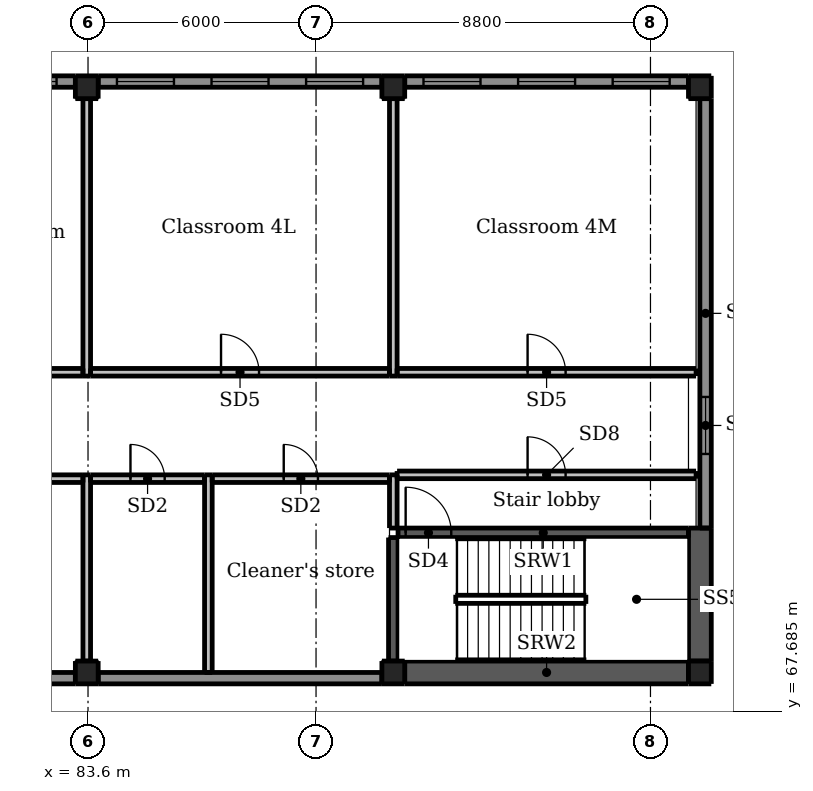
"""IFC4 building model, lengths in metres.
Left out: names, types, materials, properties, quantities, classifications, styles, units other than length and angle.
Written with IfcOpenShell. Run it as: python <this file> out.ifc"""

import sys

from ifc_helpers import new_model, si_unit, direction, frame, frame_2d, origin, origin_2d, place, context, subcontext, project, spatial, rectangle, extrude, element, fill, save


model = new_model("IFC4")
c1 = context("Model", 3, precision=1e-05, world=origin(), true_north=direction((0.0, 1.0)))
c2 = subcontext(c1, "Body", "Model", "MODEL_VIEW")
j1 = project(units=[si_unit("LENGTHUNIT", "METRE"), si_unit("PLANEANGLEUNIT", "RADIAN")], contexts=[c1])
p1 = place(None, origin())
s1 = spatial("IfcSite", under=j1, at=p1, CompositionType="ELEMENT")
p2 = place(p1, origin())
s2 = spatial("IfcBuilding", under=s1, at=p2, CompositionType="ELEMENT")
p3 = place(p2, frame((0.0, 0.0, 19.0)))
s3 = spatial("IfcBuildingStorey", under=s2, at=p3, CompositionType="ELEMENT", Elevation=19.0)
for number, where, z_axis, x_axis in (
    (1, (83.6, 67.4, 0.0), (0.0, 0.0, 1.0), (1.0, 0.0, 0.0)),
    (2, (89.6, 67.4, 0.0), (0.0, 0.0, 1.0), (1.0, 0.0, 0.0)),
):
    element("IfcColumn", number, at=place(p3, frame(where, z_axis=z_axis, x_axis=x_axis)), inside=s3, PredefinedType="COLUMN", context=c2, shape_type="SweptSolid", body=[
        extrude(rectangle(XDim=1.2, YDim=1.2, at=origin_2d()), origin(), (0.0, 0.0, 1.0), 4.25),
    ])
for number, where, z_axis, x_axis in (
    (3, (83.567, 84.1, -0.3), (0.0, 0.0, 1.0), (1.0, 0.0, 0.0)),
    (4, (83.567, 68.7, -0.3), (0.0, 0.0, 1.0), (1.0, 0.0, 0.0)),
    (5, (91.633, 84.1, -0.3), (0.0, 0.0, 1.0), (1.0, 0.0, 0.0)),
    (6, (91.633, 68.7, -0.3), (0.0, 0.0, 1.0), (1.0, 0.0, 0.0)),
    (7, (99.7, 84.1, -0.3), (0.0, 0.0, 1.0), (1.0, 0.0, 0.0)),
):
    element("IfcColumn", number, at=place(p3, frame(where, z_axis=z_axis, x_axis=x_axis)), inside=s3, PredefinedType="COLUMN", context=c2, shape_type="SweptSolid", body=[
        extrude(rectangle(XDim=0.6, YDim=0.6, at=origin_2d()), origin(), (0.0, 0.0, 1.0), 4.35),
    ])
p4 = place(p3, frame((99.7, 68.7, -0.3), z_axis=(0.0, 0.0, 1.0), x_axis=(1.0, 0.0, 0.0)))
e8 = element("IfcColumn", 8, at=p4, inside=s3, PredefinedType="COLUMN", context=c2, shape_type="SweptSolid", body=[
    extrude(rectangle(XDim=0.6, YDim=0.6, at=origin_2d()), origin(), (0.0, 0.0, 1.0), 4.8),
])
p5 = place(p3, frame((91.758, 72.375, -0.3), z_axis=(0.0, 0.0, 1.0), x_axis=(1.0, 0.0, 0.0)))
e9 = element("IfcWall", 9, at=p5, inside=s3, PredefinedType="SHEAR", context=c2, shape_type="SweptSolid", body=[
    extrude(rectangle(XDim=7.642, YDim=0.25, at=frame_2d((3.821, 0.0))), origin(), (0.0, 0.0, 1.0), 4.8),
])
p6 = place(p5, frame((0.2, 0.0, 0.3)))
e10 = element("IfcOpeningElement", 10, at=p6, cuts=e9, PredefinedType="OPENING", context=c2, shape_type="SweptSolid", body=[
    extrude(rectangle(XDim=1.2, YDim=2.1, at=frame_2d((0.6, 1.05))), frame((0.0, 0.135, 0.0), z_axis=(0.0, -1.0, 0.0), x_axis=(1.0, 0.0, 0.0)), (0.0, 0.0, 1.0), 0.27),
])
p7 = place(p3, frame((91.633, 69.0, -0.3), z_axis=(0.0, 0.0, 1.0), x_axis=(0.0, 1.0, 0.0)))
e11 = element("IfcWall", 11, at=p7, inside=s3, PredefinedType="SHEAR", context=c2, shape_type="SweptSolid", body=[
    extrude(rectangle(XDim=3.25, YDim=0.25, at=frame_2d((1.625, 0.0))), origin(), (0.0, 0.0, 1.0), 4.8),
])
p8 = place(p3, frame((99.7, 69.0, -0.3), z_axis=(0.0, 0.0, 1.0), x_axis=(0.0, 1.0, 0.0)))
e12 = element("IfcWall", 12, at=p8, inside=s3, PredefinedType="SHEAR", context=c2, shape_type="SweptSolid", body=[
    extrude(rectangle(XDim=3.5, YDim=0.6, at=frame_2d((1.75, 0.0))), origin(), (0.0, 0.0, 1.0), 4.8),
])
p9 = place(p3, frame((91.933, 68.7, -0.3), z_axis=(0.0, 0.0, 1.0), x_axis=(1.0, 0.0, 0.0)))
e13 = element("IfcWall", 13, at=p9, inside=s3, PredefinedType="SHEAR", context=c2, shape_type="SweptSolid", body=[
    extrude(rectangle(XDim=7.467, YDim=0.6, at=frame_2d((3.733, 0.0))), origin(), (0.0, 0.0, 1.0), 4.8),
])
for number, where, z_axis, x_axis in (
    (14, (78.2, 67.875, 0.0), (0.0, 0.0, 1.0), (1.0, 0.0, 0.0)),
    (15, (84.2, 67.875, 0.0), (0.0, 0.0, 1.0), (1.0, 0.0, 0.0)),
):
    element("IfcWall", number, at=place(p3, frame(where, z_axis=z_axis, x_axis=x_axis)), inside=s3, PredefinedType="SOLIDWALL", context=c2, shape_type="SweptSolid", body=[
        extrude(rectangle(XDim=4.8, YDim=0.25, at=frame_2d((2.4, 0.0))), origin(), (0.0, 0.0, 1.0), 4.25),
    ])
p10 = place(p3, frame((90.2, 67.875, 0.0), z_axis=(0.0, 0.0, 1.0), x_axis=(1.0, 0.0, 0.0)))
e16 = element("IfcWall", 16, at=p10, inside=s3, PredefinedType="SOLIDWALL", context=c2, shape_type="SweptSolid", body=[
    extrude(rectangle(XDim=9.8, YDim=0.25, at=frame_2d((4.9, 0.0))), origin(), (0.0, 0.0, 1.0), 4.25),
])
p11 = place(p3, frame((75.8, 84.25, 0.0), z_axis=(0.0, 0.0, 1.0), x_axis=(1.0, 0.0, 0.0)))
e17 = element("IfcWall", 17, at=p11, inside=s3, PredefinedType="SOLIDWALL", context=c2, shape_type="SweptSolid", body=[
    extrude(rectangle(XDim=7.467, YDim=0.3, at=frame_2d((3.733, 0.0))), origin(), (0.0, 0.0, 1.0), 3.15),
])
p12 = place(p11, frame((0.494, 0.0, 0.9)))
e18 = element("IfcOpeningElement", 18, at=p12, cuts=e17, PredefinedType="OPENING", context=c2, shape_type="SweptSolid", body=[
    extrude(rectangle(XDim=1.5, YDim=1.5, at=frame_2d((0.75, 0.75))), frame((0.0, 0.16, 0.0), z_axis=(0.0, -1.0, 0.0), x_axis=(1.0, 0.0, 0.0)), (0.0, 0.0, 1.0), 0.32),
])
p13 = place(p11, frame((2.983, 0.0, 0.9)))
e19 = element("IfcOpeningElement", 19, at=p13, cuts=e17, PredefinedType="OPENING", context=c2, shape_type="SweptSolid", body=[
    extrude(rectangle(XDim=1.5, YDim=1.5, at=frame_2d((0.75, 0.75))), frame((0.0, 0.16, 0.0), z_axis=(0.0, -1.0, 0.0), x_axis=(1.0, 0.0, 0.0)), (0.0, 0.0, 1.0), 0.32),
])
p14 = place(p11, frame((5.472, 0.0, 0.9)))
e20 = element("IfcOpeningElement", 20, at=p14, cuts=e17, PredefinedType="OPENING", context=c2, shape_type="SweptSolid", body=[
    extrude(rectangle(XDim=1.5, YDim=1.5, at=frame_2d((0.75, 0.75))), frame((0.0, 0.16, 0.0), z_axis=(0.0, -1.0, 0.0), x_axis=(1.0, 0.0, 0.0)), (0.0, 0.0, 1.0), 0.32),
])
p15 = place(p3, frame((83.867, 84.25, 0.0), z_axis=(0.0, 0.0, 1.0), x_axis=(1.0, 0.0, 0.0)))
e21 = element("IfcWall", 21, at=p15, inside=s3, PredefinedType="SOLIDWALL", context=c2, shape_type="SweptSolid", body=[
    extrude(rectangle(XDim=7.466, YDim=0.3, at=frame_2d((3.733, 0.0))), origin(), (0.0, 0.0, 1.0), 3.15),
])
p16 = place(p15, frame((0.494, 0.0, 0.9)))
e22 = element("IfcOpeningElement", 22, at=p16, cuts=e21, PredefinedType="OPENING", context=c2, shape_type="SweptSolid", body=[
    extrude(rectangle(XDim=1.5, YDim=1.5, at=frame_2d((0.75, 0.75))), frame((0.0, 0.16, 0.0), z_axis=(0.0, -1.0, 0.0), x_axis=(1.0, 0.0, 0.0)), (0.0, 0.0, 1.0), 0.32),
])
p17 = place(p15, frame((2.983, 0.0, 0.9)))
e23 = element("IfcOpeningElement", 23, at=p17, cuts=e21, PredefinedType="OPENING", context=c2, shape_type="SweptSolid", body=[
    extrude(rectangle(XDim=1.5, YDim=1.5, at=frame_2d((0.75, 0.75))), frame((0.0, 0.16, 0.0), z_axis=(0.0, -1.0, 0.0), x_axis=(1.0, 0.0, 0.0)), (0.0, 0.0, 1.0), 0.32),
])
p18 = place(p15, frame((5.472, 0.0, 0.9)))
e24 = element("IfcOpeningElement", 24, at=p18, cuts=e21, PredefinedType="OPENING", context=c2, shape_type="SweptSolid", body=[
    extrude(rectangle(XDim=1.5, YDim=1.5, at=frame_2d((0.75, 0.75))), frame((0.0, 0.16, 0.0), z_axis=(0.0, -1.0, 0.0), x_axis=(1.0, 0.0, 0.0)), (0.0, 0.0, 1.0), 0.32),
])
p19 = place(p3, frame((91.933, 84.25, 0.0), z_axis=(0.0, 0.0, 1.0), x_axis=(1.0, 0.0, 0.0)))
e25 = element("IfcWall", 25, at=p19, inside=s3, PredefinedType="SOLIDWALL", context=c2, shape_type="SweptSolid", body=[
    extrude(rectangle(XDim=7.467, YDim=0.3, at=frame_2d((3.733, 0.0))), origin(), (0.0, 0.0, 1.0), 3.15),
])
p20 = place(p19, frame((0.494, 0.0, 0.9)))
e26 = element("IfcOpeningElement", 26, at=p20, cuts=e25, PredefinedType="OPENING", context=c2, shape_type="SweptSolid", body=[
    extrude(rectangle(XDim=1.5, YDim=1.5, at=frame_2d((0.75, 0.75))), frame((0.0, 0.16, 0.0), z_axis=(0.0, -1.0, 0.0), x_axis=(1.0, 0.0, 0.0)), (0.0, 0.0, 1.0), 0.32),
])
p21 = place(p19, frame((2.983, 0.0, 0.9)))
e27 = element("IfcOpeningElement", 27, at=p21, cuts=e25, PredefinedType="OPENING", context=c2, shape_type="SweptSolid", body=[
    extrude(rectangle(XDim=1.5, YDim=1.5, at=frame_2d((0.75, 0.75))), frame((0.0, 0.16, 0.0), z_axis=(0.0, -1.0, 0.0), x_axis=(1.0, 0.0, 0.0)), (0.0, 0.0, 1.0), 0.32),
])
p22 = place(p19, frame((5.472, 0.0, 0.9)))
e28 = element("IfcOpeningElement", 28, at=p22, cuts=e25, PredefinedType="OPENING", context=c2, shape_type="SweptSolid", body=[
    extrude(rectangle(XDim=1.5, YDim=1.5, at=frame_2d((0.75, 0.75))), frame((0.0, 0.16, 0.0), z_axis=(0.0, -1.0, 0.0), x_axis=(1.0, 0.0, 0.0)), (0.0, 0.0, 1.0), 0.32),
])
p23 = place(p3, frame((99.85, 72.5, 0.0), z_axis=(0.0, 0.0, 1.0), x_axis=(0.0, 1.0, 0.0)))
e29 = element("IfcWall", 29, at=p23, inside=s3, PredefinedType="SOLIDWALL", context=c2, shape_type="SweptSolid", body=[
    extrude(rectangle(XDim=11.3, YDim=0.3, at=frame_2d((5.65, 0.0))), origin(), (0.0, 0.0, 1.0), 2.85),
])
p24 = place(p23, frame((1.95, 0.0, 0.9)))
e30 = element("IfcOpeningElement", 30, at=p24, cuts=e29, PredefinedType="OPENING", context=c2, shape_type="SweptSolid", body=[
    extrude(rectangle(XDim=1.5, YDim=1.5, at=frame_2d((0.75, 0.75))), frame((0.0, 0.16, 0.0), z_axis=(0.0, -1.0, 0.0), x_axis=(1.0, 0.0, 0.0)), (0.0, 0.0, 1.0), 0.32),
])
p25 = place(p3, frame((75.8, 68.55, 0.0), z_axis=(0.0, 0.0, 1.0), x_axis=(1.0, 0.0, 0.0)))
e31 = element("IfcWall", 31, at=p25, inside=s3, PredefinedType="SOLIDWALL", context=c2, shape_type="SweptSolid", body=[
    extrude(rectangle(XDim=7.467, YDim=0.3, at=frame_2d((3.733, 0.0))), origin(), (0.0, 0.0, 1.0), 3.15),
])
p26 = place(p3, frame((83.867, 68.55, 0.0), z_axis=(0.0, 0.0, 1.0), x_axis=(1.0, 0.0, 0.0)))
e32 = element("IfcWall", 32, at=p26, inside=s3, PredefinedType="SOLIDWALL", context=c2, shape_type="SweptSolid", body=[
    extrude(rectangle(XDim=7.466, YDim=0.3, at=frame_2d((3.733, 0.0))), origin(), (0.0, 0.0, 1.0), 3.15),
])
p27 = place(p3, frame((67.533, 76.6, 0.0), z_axis=(0.0, 0.0, 1.0), x_axis=(1.0, 0.0, 0.0)))
e33 = element("IfcWall", 33, at=p27, inside=s3, PredefinedType="PARTITIONING", context=c2, shape_type="SweptSolid", body=[
    extrude(rectangle(XDim=15.934, YDim=0.2, at=frame_2d((7.967, 0.0))), origin(), (0.0, 0.0, 1.0), 2.85),
])
p28 = place(p27, frame((7.467, 0.0, 0.0)))
e34 = element("IfcOpeningElement", 34, at=p28, cuts=e33, PredefinedType="OPENING", context=c2, shape_type="SweptSolid", body=[
    extrude(rectangle(XDim=1.0, YDim=2.1, at=frame_2d((0.5, 1.05))), frame((0.0, 0.11, 0.0), z_axis=(0.0, -1.0, 0.0), x_axis=(1.0, 0.0, 0.0)), (0.0, 0.0, 1.0), 0.22),
])
p29 = place(p3, frame((83.667, 76.6, 0.0), z_axis=(0.0, 0.0, 1.0), x_axis=(1.0, 0.0, 0.0)))
e35 = element("IfcWall", 35, at=p29, inside=s3, PredefinedType="PARTITIONING", context=c2, shape_type="SweptSolid", body=[
    extrude(rectangle(XDim=7.866, YDim=0.2, at=frame_2d((3.933, 0.0))), origin(), (0.0, 0.0, 1.0), 2.85),
])
p30 = place(p29, frame((3.433, 0.0, 0.0)))
e36 = element("IfcOpeningElement", 36, at=p30, cuts=e35, PredefinedType="OPENING", context=c2, shape_type="SweptSolid", body=[
    extrude(rectangle(XDim=1.0, YDim=2.1, at=frame_2d((0.5, 1.05))), frame((0.0, 0.11, 0.0), z_axis=(0.0, -1.0, 0.0), x_axis=(1.0, 0.0, 0.0)), (0.0, 0.0, 1.0), 0.22),
])
p31 = place(p3, frame((91.733, 76.6, 0.0), z_axis=(0.0, 0.0, 1.0), x_axis=(1.0, 0.0, 0.0)))
e37 = element("IfcWall", 37, at=p31, inside=s3, PredefinedType="PARTITIONING", context=c2, shape_type="SweptSolid", body=[
    extrude(rectangle(XDim=7.867, YDim=0.2, at=frame_2d((3.934, 0.0))), origin(), (0.0, 0.0, 1.0), 2.85),
])
p32 = place(p31, frame((3.434, 0.0, 0.0)))
e38 = element("IfcOpeningElement", 38, at=p32, cuts=e37, PredefinedType="OPENING", context=c2, shape_type="SweptSolid", body=[
    extrude(rectangle(XDim=1.0, YDim=2.1, at=frame_2d((0.5, 1.05))), frame((0.0, 0.11, 0.0), z_axis=(0.0, -1.0, 0.0), x_axis=(1.0, 0.0, 0.0)), (0.0, 0.0, 1.0), 0.22),
])
for number, where, z_axis, x_axis in (
    (39, (83.567, 76.5, 0.0), (0.0, 0.0, 1.0), (0.0, 1.0, 0.0)),
    (40, (91.633, 76.5, 0.0), (0.0, 0.0, 1.0), (0.0, 1.0, 0.0)),
):
    element("IfcWall", number, at=place(p3, frame(where, z_axis=z_axis, x_axis=x_axis)), inside=s3, PredefinedType="PARTITIONING", context=c2, shape_type="SweptSolid", body=[
        extrude(rectangle(XDim=7.3, YDim=0.2, at=frame_2d((3.65, 0.0))), origin(), (0.0, 0.0, 1.0), 2.85),
    ])
p33 = place(p3, frame((75.6, 73.8, 0.0), z_axis=(0.0, 0.0, 1.0), x_axis=(1.0, 0.0, 0.0)))
e41 = element("IfcWall", 41, at=p33, inside=s3, PredefinedType="PARTITIONING", context=c2, shape_type="SweptSolid", body=[
    extrude(rectangle(XDim=7.867, YDim=0.2, at=frame_2d((3.934, 0.0))), origin(), (0.0, 0.0, 1.0), 2.85),
])
p34 = place(p33, frame((3.483, 0.0, 0.0)))
e42 = element("IfcOpeningElement", 42, at=p34, cuts=e41, PredefinedType="OPENING", context=c2, shape_type="SweptSolid", body=[
    extrude(rectangle(XDim=0.9, YDim=2.1, at=frame_2d((0.45, 1.05))), frame((0.0, 0.11, 0.0), z_axis=(0.0, -1.0, 0.0), x_axis=(1.0, 0.0, 0.0)), (0.0, 0.0, 1.0), 0.22),
])
p35 = place(p3, frame((83.667, 73.8, 0.0), z_axis=(0.0, 0.0, 1.0), x_axis=(1.0, 0.0, 0.0)))
e43 = element("IfcWall", 43, at=p35, inside=s3, PredefinedType="PARTITIONING", context=c2, shape_type="SweptSolid", body=[
    extrude(rectangle(XDim=3.0, YDim=0.2, at=frame_2d((1.5, 0.0))), origin(), (0.0, 0.0, 1.0), 2.85),
])
p36 = place(p35, frame((1.05, 0.0, 0.0)))
e44 = element("IfcOpeningElement", 44, at=p36, cuts=e43, PredefinedType="OPENING", context=c2, shape_type="SweptSolid", body=[
    extrude(rectangle(XDim=0.9, YDim=2.1, at=frame_2d((0.45, 1.05))), frame((0.0, 0.11, 0.0), z_axis=(0.0, -1.0, 0.0), x_axis=(1.0, 0.0, 0.0)), (0.0, 0.0, 1.0), 0.22),
])
p37 = place(p3, frame((86.867, 73.8, 0.0), z_axis=(0.0, 0.0, 1.0), x_axis=(1.0, 0.0, 0.0)))
e45 = element("IfcWall", 45, at=p37, inside=s3, PredefinedType="PARTITIONING", context=c2, shape_type="SweptSolid", body=[
    extrude(rectangle(XDim=4.666, YDim=0.2, at=frame_2d((2.333, 0.0))), origin(), (0.0, 0.0, 1.0), 2.85),
])
p38 = place(p37, frame((1.883, 0.0, 0.0)))
e46 = element("IfcOpeningElement", 46, at=p38, cuts=e45, PredefinedType="OPENING", context=c2, shape_type="SweptSolid", body=[
    extrude(rectangle(XDim=0.9, YDim=2.1, at=frame_2d((0.45, 1.05))), frame((0.0, 0.11, 0.0), z_axis=(0.0, -1.0, 0.0), x_axis=(1.0, 0.0, 0.0)), (0.0, 0.0, 1.0), 0.22),
])
p39 = place(p3, frame((83.567, 69.0, 0.0), z_axis=(0.0, 0.0, 1.0), x_axis=(0.0, 1.0, 0.0)))
e47 = element("IfcWall", 47, at=p39, inside=s3, PredefinedType="PARTITIONING", context=c2, shape_type="SweptSolid", body=[
    extrude(rectangle(XDim=4.9, YDim=0.2, at=frame_2d((2.45, 0.0))), origin(), (0.0, 0.0, 1.0), 2.85),
])
p40 = place(p3, frame((91.633, 72.5, 0.0), z_axis=(0.0, 0.0, 1.0), x_axis=(0.0, 1.0, 0.0)))
e48 = element("IfcWall", 48, at=p40, inside=s3, PredefinedType="PARTITIONING", context=c2, shape_type="SweptSolid", body=[
    extrude(rectangle(XDim=1.4, YDim=0.2, at=frame_2d((0.7, 0.0))), origin(), (0.0, 0.0, 1.0), 2.85),
])
p41 = place(p3, frame((86.767, 68.7, 0.0), z_axis=(0.0, 0.0, 1.0), x_axis=(0.0, 1.0, 0.0)))
e49 = element("IfcWall", 49, at=p41, inside=s3, PredefinedType="PARTITIONING", context=c2, shape_type="SweptSolid", body=[
    extrude(rectangle(XDim=5.2, YDim=0.2, at=frame_2d((2.6, 0.0))), origin(), (0.0, 0.0, 1.0), 2.85),
])
p42 = place(p3, frame((91.733, 73.9, 0.0), z_axis=(0.0, 0.0, 1.0), x_axis=(1.0, 0.0, 0.0)))
e50 = element("IfcWall", 50, at=p42, inside=s3, PredefinedType="PARTITIONING", context=c2, shape_type="SweptSolid", body=[
    extrude(rectangle(XDim=7.867, YDim=0.2, at=frame_2d((3.934, 0.0))), origin(), (0.0, 0.0, 1.0), 2.85),
])
p43 = place(p42, frame((3.434, 0.0, 0.0)))
e51 = element("IfcOpeningElement", 51, at=p43, cuts=e50, PredefinedType="OPENING", context=c2, shape_type="SweptSolid", body=[
    extrude(rectangle(XDim=1.0, YDim=2.1, at=frame_2d((0.5, 1.05))), frame((0.0, 0.11, 0.0), z_axis=(0.0, -1.0, 0.0), x_axis=(1.0, 0.0, 0.0)), (0.0, 0.0, 1.0), 0.22),
])
p44 = place(p14, origin())
e52 = element("IfcWindow", 52, at=p44, inside=s3, PartitioningType="DOUBLE_PANEL_HORIZONTAL", PredefinedType="WINDOW", context=c2, shape_type="SweptSolid", body=[
    extrude(rectangle(XDim=1.5, YDim=1.5, at=frame_2d((0.75, 0.75))), frame((0.0, 0.03, 0.0), z_axis=(0.0, -1.0, 0.0), x_axis=(1.0, 0.0, 0.0)), (0.0, 0.0, 1.0), 0.06),
])
fill(e20, e52)
p45 = place(p16, origin())
e53 = element("IfcWindow", 53, at=p45, inside=s3, PartitioningType="DOUBLE_PANEL_HORIZONTAL", PredefinedType="WINDOW", context=c2, shape_type="SweptSolid", body=[
    extrude(rectangle(XDim=1.5, YDim=1.5, at=frame_2d((0.75, 0.75))), frame((0.0, 0.03, 0.0), z_axis=(0.0, -1.0, 0.0), x_axis=(1.0, 0.0, 0.0)), (0.0, 0.0, 1.0), 0.06),
])
fill(e22, e53)
p46 = place(p17, origin())
e54 = element("IfcWindow", 54, at=p46, inside=s3, PartitioningType="DOUBLE_PANEL_HORIZONTAL", PredefinedType="WINDOW", context=c2, shape_type="SweptSolid", body=[
    extrude(rectangle(XDim=1.5, YDim=1.5, at=frame_2d((0.75, 0.75))), frame((0.0, 0.03, 0.0), z_axis=(0.0, -1.0, 0.0), x_axis=(1.0, 0.0, 0.0)), (0.0, 0.0, 1.0), 0.06),
])
fill(e23, e54)
p47 = place(p18, origin())
e55 = element("IfcWindow", 55, at=p47, inside=s3, PartitioningType="DOUBLE_PANEL_HORIZONTAL", PredefinedType="WINDOW", context=c2, shape_type="SweptSolid", body=[
    extrude(rectangle(XDim=1.5, YDim=1.5, at=frame_2d((0.75, 0.75))), frame((0.0, 0.03, 0.0), z_axis=(0.0, -1.0, 0.0), x_axis=(1.0, 0.0, 0.0)), (0.0, 0.0, 1.0), 0.06),
])
fill(e24, e55)
p48 = place(p20, origin())
e56 = element("IfcWindow", 56, at=p48, inside=s3, PartitioningType="DOUBLE_PANEL_HORIZONTAL", PredefinedType="WINDOW", context=c2, shape_type="SweptSolid", body=[
    extrude(rectangle(XDim=1.5, YDim=1.5, at=frame_2d((0.75, 0.75))), frame((0.0, 0.03, 0.0), z_axis=(0.0, -1.0, 0.0), x_axis=(1.0, 0.0, 0.0)), (0.0, 0.0, 1.0), 0.06),
])
fill(e26, e56)
p49 = place(p21, origin())
e57 = element("IfcWindow", 57, at=p49, inside=s3, PartitioningType="DOUBLE_PANEL_HORIZONTAL", PredefinedType="WINDOW", context=c2, shape_type="SweptSolid", body=[
    extrude(rectangle(XDim=1.5, YDim=1.5, at=frame_2d((0.75, 0.75))), frame((0.0, 0.03, 0.0), z_axis=(0.0, -1.0, 0.0), x_axis=(1.0, 0.0, 0.0)), (0.0, 0.0, 1.0), 0.06),
])
fill(e27, e57)
p50 = place(p22, origin())
e58 = element("IfcWindow", 58, at=p50, inside=s3, PartitioningType="DOUBLE_PANEL_HORIZONTAL", PredefinedType="WINDOW", context=c2, shape_type="SweptSolid", body=[
    extrude(rectangle(XDim=1.5, YDim=1.5, at=frame_2d((0.75, 0.75))), frame((0.0, 0.03, 0.0), z_axis=(0.0, -1.0, 0.0), x_axis=(1.0, 0.0, 0.0)), (0.0, 0.0, 1.0), 0.06),
])
fill(e28, e58)
p51 = place(p24, origin())
e59 = element("IfcWindow", 59, at=p51, inside=s3, PartitioningType="DOUBLE_PANEL_HORIZONTAL", PredefinedType="WINDOW", context=c2, shape_type="SweptSolid", body=[
    extrude(rectangle(XDim=1.5, YDim=1.5, at=frame_2d((0.75, 0.75))), frame((0.0, 0.03, 0.0), z_axis=(0.0, -1.0, 0.0), x_axis=(1.0, 0.0, 0.0)), (0.0, 0.0, 1.0), 0.06),
])
fill(e30, e59)
p52 = place(p30, origin())
e60 = element("IfcDoor", 60, at=p52, inside=s3, OperationType="SINGLE_SWING_LEFT", PredefinedType="DOOR", context=c2, shape_type="SweptSolid", body=[
    extrude(rectangle(XDim=1.0, YDim=2.1, at=frame_2d((0.5, 1.05))), frame((0.0, 0.025, 0.0), z_axis=(0.0, -1.0, 0.0), x_axis=(1.0, 0.0, 0.0)), (0.0, 0.0, 1.0), 0.05),
])
fill(e36, e60)
p53 = place(p32, origin())
e61 = element("IfcDoor", 61, at=p53, inside=s3, OperationType="SINGLE_SWING_LEFT", PredefinedType="DOOR", context=c2, shape_type="SweptSolid", body=[
    extrude(rectangle(XDim=1.0, YDim=2.1, at=frame_2d((0.5, 1.05))), frame((0.0, 0.025, 0.0), z_axis=(0.0, -1.0, 0.0), x_axis=(1.0, 0.0, 0.0)), (0.0, 0.0, 1.0), 0.05),
])
fill(e38, e61)
p54 = place(p36, origin())
e62 = element("IfcDoor", 62, at=p54, inside=s3, OperationType="SINGLE_SWING_LEFT", PredefinedType="DOOR", context=c2, shape_type="SweptSolid", body=[
    extrude(rectangle(XDim=0.9, YDim=2.1, at=frame_2d((0.45, 1.05))), frame((0.0, 0.025, 0.0), z_axis=(0.0, -1.0, 0.0), x_axis=(1.0, 0.0, 0.0)), (0.0, 0.0, 1.0), 0.05),
])
fill(e44, e62)
p55 = place(p38, origin())
e63 = element("IfcDoor", 63, at=p55, inside=s3, OperationType="SINGLE_SWING_LEFT", PredefinedType="DOOR", context=c2, shape_type="SweptSolid", body=[
    extrude(rectangle(XDim=0.9, YDim=2.1, at=frame_2d((0.45, 1.05))), frame((0.0, 0.025, 0.0), z_axis=(0.0, -1.0, 0.0), x_axis=(1.0, 0.0, 0.0)), (0.0, 0.0, 1.0), 0.05),
])
fill(e46, e63)
p56 = place(p43, origin())
e64 = element("IfcDoor", 64, at=p56, inside=s3, OperationType="SINGLE_SWING_LEFT", PredefinedType="DOOR", context=c2, shape_type="SweptSolid", body=[
    extrude(rectangle(XDim=1.0, YDim=2.1, at=frame_2d((0.5, 1.05))), frame((0.0, 0.025, 0.0), z_axis=(0.0, -1.0, 0.0), x_axis=(1.0, 0.0, 0.0)), (0.0, 0.0, 1.0), 0.05),
])
fill(e51, e64)
p57 = place(p6, origin())
e65 = element("IfcDoor", 65, at=p57, inside=s3, OperationType="SINGLE_SWING_LEFT", PredefinedType="DOOR", context=c2, shape_type="SweptSolid", body=[
    extrude(rectangle(XDim=1.2, YDim=2.1, at=frame_2d((0.6, 1.05))), frame((0.0, 0.025, 0.0), z_axis=(0.0, -1.0, 0.0), x_axis=(1.0, 0.0, 0.0)), (0.0, 0.0, 1.0), 0.05),
])
fill(e10, e65)
save(model, sys.argv[1])
